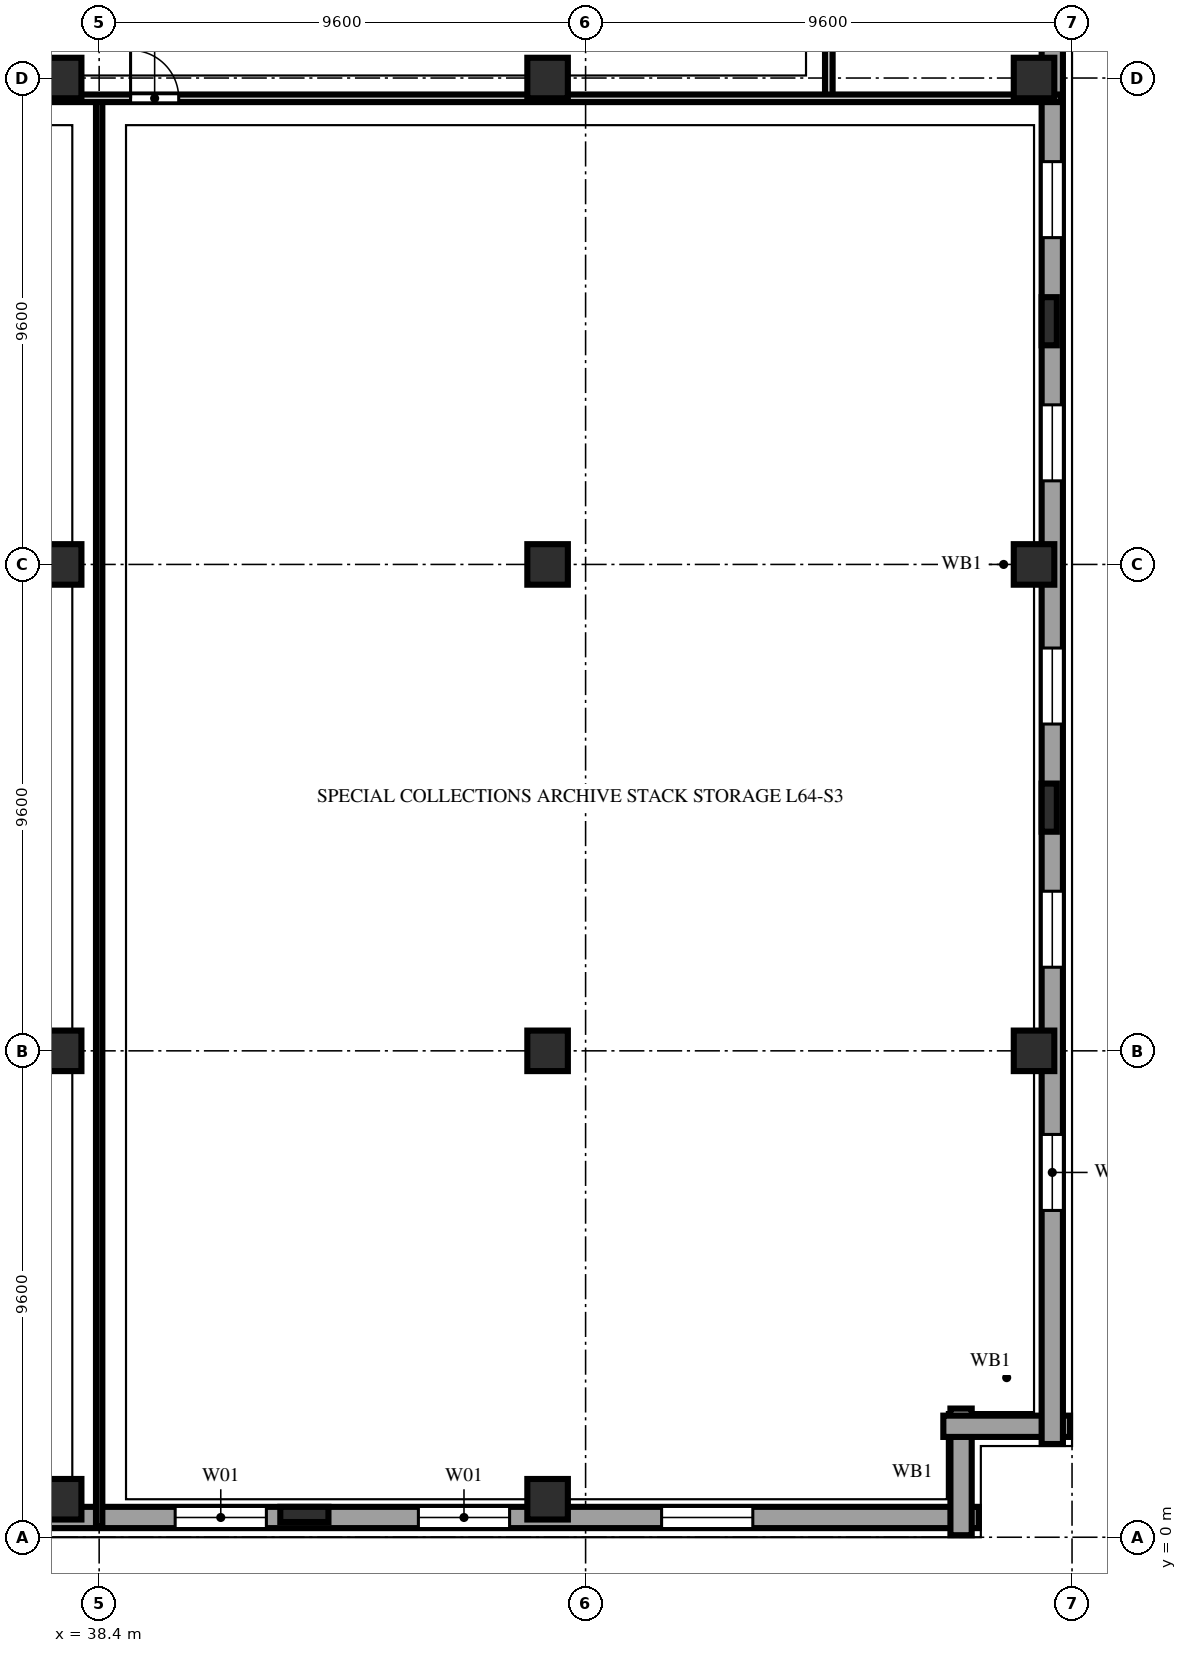
"""IFC4 building model, lengths in metres.
Left out: names, types, materials, properties, quantities, classifications, styles, units other than length and angle.
Written with IfcOpenShell. Run it as: python <this file> out.ifc"""

import sys

from ifc_helpers import new_model, si_unit, direction, frame, frame_2d, origin, origin_2d, place, context, subcontext, project, spatial, rectangle, extrude, element, fill, save


model = new_model("IFC4")
c1 = context("Model", 3, precision=1e-05, world=origin(), true_north=direction((0.0, 1.0)))
c2 = subcontext(c1, "Body", "Model", "MODEL_VIEW")
j1 = project(units=[si_unit("LENGTHUNIT", "METRE"), si_unit("PLANEANGLEUNIT", "RADIAN")], contexts=[c1])
p1 = place(None, origin())
s1 = spatial("IfcSite", under=j1, at=p1, CompositionType="ELEMENT")
p2 = place(p1, origin())
s2 = spatial("IfcBuilding", under=s1, at=p2, CompositionType="ELEMENT")
p3 = place(p2, frame((0.0, 0.0, 252.2)))
s3 = spatial("IfcBuildingStorey", under=s2, at=p3, CompositionType="ELEMENT", Elevation=252.2)
for number, where, z_axis, x_axis in (
    (1, (37.65, 0.75, 0.0), (0.0, 0.0, 1.0), (1.0, 0.0, 0.0)),
    (2, (37.65, 9.6, 0.0), (0.0, 0.0, 1.0), (1.0, 0.0, 0.0)),
    (3, (37.65, 19.2, 0.0), (0.0, 0.0, 1.0), (1.0, 0.0, 0.0)),
    (4, (37.65, 28.8, 0.0), (0.0, 0.0, 1.0), (1.0, 0.0, 0.0)),
    (5, (47.25, 0.75, 0.0), (0.0, 0.0, 1.0), (1.0, 0.0, 0.0)),
    (6, (47.25, 9.6, 0.0), (0.0, 0.0, 1.0), (1.0, 0.0, 0.0)),
    (7, (47.25, 19.2, 0.0), (0.0, 0.0, 1.0), (1.0, 0.0, 0.0)),
    (8, (47.25, 28.8, 0.0), (0.0, 0.0, 1.0), (1.0, 0.0, 0.0)),
    (9, (56.85, 9.6, 0.0), (0.0, 0.0, 1.0), (1.0, 0.0, 0.0)),
    (10, (56.85, 19.2, 0.0), (0.0, 0.0, 1.0), (1.0, 0.0, 0.0)),
    (11, (56.85, 28.8, 0.0), (0.0, 0.0, 1.0), (1.0, 0.0, 0.0)),
):
    element("IfcColumn", number, at=place(p3, frame(where, z_axis=z_axis, x_axis=x_axis)), inside=s3, PredefinedType="COLUMN", context=c2, shape_type="SweptSolid", body=[
        extrude(rectangle(XDim=0.8, YDim=0.8, at=origin_2d()), origin(), (0.0, 0.0, 1.0), 3.8),
    ])
for number, where, z_axis, x_axis in (
    (12, (42.45, 0.45, 0.0), (0.0, 0.0, 1.0), (1.0, 0.0, 0.0)),
    (13, (57.15, 14.4, 0.0), (0.0, 0.0, 1.0), (0.0, 1.0, 0.0)),
    (14, (57.15, 24.0, 0.0), (0.0, 0.0, 1.0), (0.0, 1.0, 0.0)),
):
    element("IfcColumn", number, at=place(p3, frame(where, z_axis=z_axis, x_axis=x_axis)), inside=s3, PredefinedType="PILASTER", context=c2, shape_type="SweptSolid", body=[
        extrude(rectangle(XDim=0.95, YDim=0.3, at=origin_2d()), origin(), (0.0, 0.0, 1.0), 3.8),
    ])
p4 = place(p3, frame((1.84, 0.39, 0.0), z_axis=(0.0, 0.0, 1.0), x_axis=(1.0, 0.0, 0.0)))
e15 = element("IfcWall", 15, at=p4, inside=s3, PredefinedType="SOLIDWALL", context=c2, shape_type="SweptSolid", body=[
    extrude(rectangle(XDim=53.92, YDim=0.42, at=frame_2d((26.96, 0.0))), origin(), (0.0, 0.0, 1.0), 3.48),
])
p5 = place(p4, frame((4.46, 0.0, 0.85)))
e16 = element("IfcOpeningElement", 16, at=p5, cuts=e15, PredefinedType="OPENING", context=c2, shape_type="SweptSolid", body=[
    extrude(rectangle(XDim=1.8, YDim=1.85, at=frame_2d((0.9, 0.925))), frame((0.0, 0.222, 0.0), z_axis=(0.0, -1.0, 0.0), x_axis=(1.0, 0.0, 0.0)), (0.0, 0.0, 1.0), 0.444),
])
p6 = place(p4, frame((9.26, 0.0, 0.85)))
e17 = element("IfcOpeningElement", 17, at=p6, cuts=e15, PredefinedType="OPENING", context=c2, shape_type="SweptSolid", body=[
    extrude(rectangle(XDim=1.8, YDim=1.85, at=frame_2d((0.9, 0.925))), frame((0.0, 0.222, 0.0), z_axis=(0.0, -1.0, 0.0), x_axis=(1.0, 0.0, 0.0)), (0.0, 0.0, 1.0), 0.444),
])
p7 = place(p4, frame((18.86, 0.0, 0.85)))
e18 = element("IfcOpeningElement", 18, at=p7, cuts=e15, PredefinedType="OPENING", context=c2, shape_type="SweptSolid", body=[
    extrude(rectangle(XDim=1.8, YDim=1.85, at=frame_2d((0.9, 0.925))), frame((0.0, 0.222, 0.0), z_axis=(0.0, -1.0, 0.0), x_axis=(1.0, 0.0, 0.0)), (0.0, 0.0, 1.0), 0.444),
])
p8 = place(p4, frame((28.46, 0.0, 0.85)))
e19 = element("IfcOpeningElement", 19, at=p8, cuts=e15, PredefinedType="OPENING", context=c2, shape_type="SweptSolid", body=[
    extrude(rectangle(XDim=1.8, YDim=1.85, at=frame_2d((0.9, 0.925))), frame((0.0, 0.222, 0.0), z_axis=(0.0, -1.0, 0.0), x_axis=(1.0, 0.0, 0.0)), (0.0, 0.0, 1.0), 0.444),
])
p9 = place(p4, frame((33.26, 0.0, 0.85)))
e20 = element("IfcOpeningElement", 20, at=p9, cuts=e15, PredefinedType="OPENING", context=c2, shape_type="SweptSolid", body=[
    extrude(rectangle(XDim=1.8, YDim=1.85, at=frame_2d((0.9, 0.925))), frame((0.0, 0.222, 0.0), z_axis=(0.0, -1.0, 0.0), x_axis=(1.0, 0.0, 0.0)), (0.0, 0.0, 1.0), 0.444),
])
p10 = place(p4, frame((38.06, 0.0, 0.85)))
e21 = element("IfcOpeningElement", 21, at=p10, cuts=e15, PredefinedType="OPENING", context=c2, shape_type="SweptSolid", body=[
    extrude(rectangle(XDim=1.8, YDim=1.85, at=frame_2d((0.9, 0.925))), frame((0.0, 0.222, 0.0), z_axis=(0.0, -1.0, 0.0), x_axis=(1.0, 0.0, 0.0)), (0.0, 0.0, 1.0), 0.444),
])
p11 = place(p4, frame((42.86, 0.0, 0.85)))
e22 = element("IfcOpeningElement", 22, at=p11, cuts=e15, PredefinedType="OPENING", context=c2, shape_type="SweptSolid", body=[
    extrude(rectangle(XDim=1.8, YDim=1.85, at=frame_2d((0.9, 0.925))), frame((0.0, 0.222, 0.0), z_axis=(0.0, -1.0, 0.0), x_axis=(1.0, 0.0, 0.0)), (0.0, 0.0, 1.0), 0.444),
])
p12 = place(p4, frame((47.66, 0.0, 0.85)))
e23 = element("IfcOpeningElement", 23, at=p12, cuts=e15, PredefinedType="OPENING", context=c2, shape_type="SweptSolid", body=[
    extrude(rectangle(XDim=1.8, YDim=1.85, at=frame_2d((0.9, 0.925))), frame((0.0, 0.222, 0.0), z_axis=(0.0, -1.0, 0.0), x_axis=(1.0, 0.0, 0.0)), (0.0, 0.0, 1.0), 0.444),
])
for number, where, z_axis, x_axis in (
    (24, (55.41, 0.04, 0.0), (0.0, 0.0, 1.0), (0.0, 1.0, 0.0)),
    (25, (55.06, 2.19, 0.0), (0.0, 0.0, 1.0), (1.0, 0.0, 0.0)),
):
    element("IfcWall", number, at=place(p3, frame(where, z_axis=z_axis, x_axis=x_axis)), inside=s3, PredefinedType="SOLIDWALL", context=c2, shape_type="SweptSolid", body=[
        extrude(rectangle(XDim=2.5, YDim=0.42, at=frame_2d((1.25, 0.0))), origin(), (0.0, 0.0, 1.0), 3.48),
    ])
p13 = place(p3, frame((57.21, 1.84, 0.0), z_axis=(0.0, 0.0, 1.0), x_axis=(0.0, 1.0, 0.0)))
e26 = element("IfcWall", 26, at=p13, inside=s3, PredefinedType="SOLIDWALL", context=c2, shape_type="SweptSolid", body=[
    extrude(rectangle(XDim=34.72, YDim=0.42, at=frame_2d((17.36, 0.0))), origin(), (0.0, 0.0, 1.0), 3.48),
])
p14 = place(p13, frame((4.61, 0.0, 0.85)))
e27 = element("IfcOpeningElement", 27, at=p14, cuts=e26, PredefinedType="OPENING", context=c2, shape_type="SweptSolid", body=[
    extrude(rectangle(XDim=1.5, YDim=1.85, at=frame_2d((0.75, 0.925))), frame((0.0, 0.222, 0.0), z_axis=(0.0, -1.0, 0.0), x_axis=(1.0, 0.0, 0.0)), (0.0, 0.0, 1.0), 0.444),
])
p15 = place(p13, frame((9.41, 0.0, 0.85)))
e28 = element("IfcOpeningElement", 28, at=p15, cuts=e26, PredefinedType="OPENING", context=c2, shape_type="SweptSolid", body=[
    extrude(rectangle(XDim=1.5, YDim=1.85, at=frame_2d((0.75, 0.925))), frame((0.0, 0.222, 0.0), z_axis=(0.0, -1.0, 0.0), x_axis=(1.0, 0.0, 0.0)), (0.0, 0.0, 1.0), 0.444),
])
p16 = place(p13, frame((14.21, 0.0, 0.85)))
e29 = element("IfcOpeningElement", 29, at=p16, cuts=e26, PredefinedType="OPENING", context=c2, shape_type="SweptSolid", body=[
    extrude(rectangle(XDim=1.5, YDim=1.85, at=frame_2d((0.75, 0.925))), frame((0.0, 0.222, 0.0), z_axis=(0.0, -1.0, 0.0), x_axis=(1.0, 0.0, 0.0)), (0.0, 0.0, 1.0), 0.444),
])
p17 = place(p13, frame((19.01, 0.0, 0.85)))
e30 = element("IfcOpeningElement", 30, at=p17, cuts=e26, PredefinedType="OPENING", context=c2, shape_type="SweptSolid", body=[
    extrude(rectangle(XDim=1.5, YDim=1.85, at=frame_2d((0.75, 0.925))), frame((0.0, 0.222, 0.0), z_axis=(0.0, -1.0, 0.0), x_axis=(1.0, 0.0, 0.0)), (0.0, 0.0, 1.0), 0.444),
])
p18 = place(p13, frame((23.81, 0.0, 0.85)))
e31 = element("IfcOpeningElement", 31, at=p18, cuts=e26, PredefinedType="OPENING", context=c2, shape_type="SweptSolid", body=[
    extrude(rectangle(XDim=1.5, YDim=1.85, at=frame_2d((0.75, 0.925))), frame((0.0, 0.222, 0.0), z_axis=(0.0, -1.0, 0.0), x_axis=(1.0, 0.0, 0.0)), (0.0, 0.0, 1.0), 0.444),
])
p19 = place(p3, frame((52.8, 28.4, 0.0), z_axis=(0.0, 0.0, 1.0), x_axis=(0.0, 1.0, 0.0)))
e32 = element("IfcWall", 32, at=p19, inside=s3, PredefinedType="PARTITIONING", context=c2, shape_type="SweptSolid", body=[
    extrude(rectangle(XDim=2.15, YDim=0.15, at=frame_2d((1.075, 0.0))), origin(), (0.0, 0.0, 1.0), 3.48),
])
p20 = place(p3, frame((38.4, 0.22, 0.0), z_axis=(0.0, 0.0, 1.0), x_axis=(0.0, 1.0, 0.0)))
e33 = element("IfcWall", 33, at=p20, inside=s3, PredefinedType="PARTITIONING", context=c2, shape_type="SweptSolid", body=[
    extrude(rectangle(XDim=28.18, YDim=0.125, at=frame_2d((14.09, 0.0))), origin(), (0.0, 0.0, 1.0), 3.48),
])
p21 = place(p3, frame((33.62, 28.4, 0.0), z_axis=(0.0, 0.0, 1.0), x_axis=(1.0, 0.0, 0.0)))
e34 = element("IfcWall", 34, at=p21, inside=s3, PredefinedType="PARTITIONING", context=c2, shape_type="SweptSolid", body=[
    extrude(rectangle(XDim=23.76, YDim=0.15, at=frame_2d((11.88, 0.0))), origin(), (0.0, 0.0, 1.0), 3.48),
])
p22 = place(p21, frame((1.4, 0.0, 0.0)))
e35 = element("IfcOpeningElement", 35, at=p22, cuts=e34, PredefinedType="OPENING", context=c2, shape_type="SweptSolid", body=[
    extrude(rectangle(XDim=0.95, YDim=2.15, at=frame_2d((0.475, 1.075))), frame((0.0, 0.087, 0.0), z_axis=(0.0, -1.0, 0.0), x_axis=(1.0, 0.0, 0.0)), (0.0, 0.0, 1.0), 0.174),
])
p23 = place(p21, frame((5.4, 0.0, 0.0)))
e36 = element("IfcOpeningElement", 36, at=p23, cuts=e34, PredefinedType="OPENING", context=c2, shape_type="SweptSolid", body=[
    extrude(rectangle(XDim=0.95, YDim=2.15, at=frame_2d((0.475, 1.075))), frame((0.0, 0.087, 0.0), z_axis=(0.0, -1.0, 0.0), x_axis=(1.0, 0.0, 0.0)), (0.0, 0.0, 1.0), 0.174),
])
p24 = place(p10, origin())
e37 = element("IfcWindow", 37, at=p24, inside=s3, PartitioningType="DOUBLE_PANEL_VERTICAL", PredefinedType="WINDOW", context=c2, shape_type="SweptSolid", body=[
    extrude(rectangle(XDim=1.8, YDim=1.85, at=frame_2d((0.9, 0.925))), frame((0.0, 0.11, 0.0), z_axis=(0.0, -1.0, 0.0), x_axis=(1.0, 0.0, 0.0)), (0.0, 0.0, 1.0), 0.06),
])
fill(e21, e37)
p25 = place(p11, origin())
e38 = element("IfcWindow", 38, at=p25, inside=s3, PartitioningType="DOUBLE_PANEL_VERTICAL", PredefinedType="WINDOW", context=c2, shape_type="SweptSolid", body=[
    extrude(rectangle(XDim=1.8, YDim=1.85, at=frame_2d((0.9, 0.925))), frame((0.0, 0.11, 0.0), z_axis=(0.0, -1.0, 0.0), x_axis=(1.0, 0.0, 0.0)), (0.0, 0.0, 1.0), 0.06),
])
fill(e22, e38)
p26 = place(p12, origin())
e39 = element("IfcWindow", 39, at=p26, inside=s3, PartitioningType="DOUBLE_PANEL_VERTICAL", PredefinedType="WINDOW", context=c2, shape_type="SweptSolid", body=[
    extrude(rectangle(XDim=1.8, YDim=1.85, at=frame_2d((0.9, 0.925))), frame((0.0, 0.11, 0.0), z_axis=(0.0, -1.0, 0.0), x_axis=(1.0, 0.0, 0.0)), (0.0, 0.0, 1.0), 0.06),
])
fill(e23, e39)
p27 = place(p14, origin())
e40 = element("IfcWindow", 40, at=p27, inside=s3, PartitioningType="DOUBLE_PANEL_VERTICAL", PredefinedType="WINDOW", context=c2, shape_type="SweptSolid", body=[
    extrude(rectangle(XDim=1.5, YDim=1.85, at=frame_2d((0.75, 0.925))), frame((0.0, 0.11, 0.0), z_axis=(0.0, -1.0, 0.0), x_axis=(1.0, 0.0, 0.0)), (0.0, 0.0, 1.0), 0.06),
])
fill(e27, e40)
p28 = place(p15, origin())
e41 = element("IfcWindow", 41, at=p28, inside=s3, PartitioningType="DOUBLE_PANEL_VERTICAL", PredefinedType="WINDOW", context=c2, shape_type="SweptSolid", body=[
    extrude(rectangle(XDim=1.5, YDim=1.85, at=frame_2d((0.75, 0.925))), frame((0.0, 0.11, 0.0), z_axis=(0.0, -1.0, 0.0), x_axis=(1.0, 0.0, 0.0)), (0.0, 0.0, 1.0), 0.06),
])
fill(e28, e41)
p29 = place(p16, origin())
e42 = element("IfcWindow", 42, at=p29, inside=s3, PartitioningType="DOUBLE_PANEL_VERTICAL", PredefinedType="WINDOW", context=c2, shape_type="SweptSolid", body=[
    extrude(rectangle(XDim=1.5, YDim=1.85, at=frame_2d((0.75, 0.925))), frame((0.0, 0.11, 0.0), z_axis=(0.0, -1.0, 0.0), x_axis=(1.0, 0.0, 0.0)), (0.0, 0.0, 1.0), 0.06),
])
fill(e29, e42)
p30 = place(p17, origin())
e43 = element("IfcWindow", 43, at=p30, inside=s3, PartitioningType="DOUBLE_PANEL_VERTICAL", PredefinedType="WINDOW", context=c2, shape_type="SweptSolid", body=[
    extrude(rectangle(XDim=1.5, YDim=1.85, at=frame_2d((0.75, 0.925))), frame((0.0, 0.11, 0.0), z_axis=(0.0, -1.0, 0.0), x_axis=(1.0, 0.0, 0.0)), (0.0, 0.0, 1.0), 0.06),
])
fill(e30, e43)
p31 = place(p18, origin())
e44 = element("IfcWindow", 44, at=p31, inside=s3, PartitioningType="DOUBLE_PANEL_VERTICAL", PredefinedType="WINDOW", context=c2, shape_type="SweptSolid", body=[
    extrude(rectangle(XDim=1.5, YDim=1.85, at=frame_2d((0.75, 0.925))), frame((0.0, 0.11, 0.0), z_axis=(0.0, -1.0, 0.0), x_axis=(1.0, 0.0, 0.0)), (0.0, 0.0, 1.0), 0.06),
])
fill(e31, e44)
p32 = place(p23, origin())
e45 = element("IfcDoor", 45, at=p32, inside=s3, OperationType="SINGLE_SWING_LEFT", PredefinedType="DOOR", context=c2, shape_type="SweptSolid", body=[
    extrude(rectangle(XDim=0.95, YDim=2.15, at=frame_2d((0.475, 1.075))), frame((0.0, 0.025, 0.0), z_axis=(0.0, -1.0, 0.0), x_axis=(1.0, 0.0, 0.0)), (0.0, 0.0, 1.0), 0.05),
])
fill(e36, e45)
save(model, sys.argv[1])
